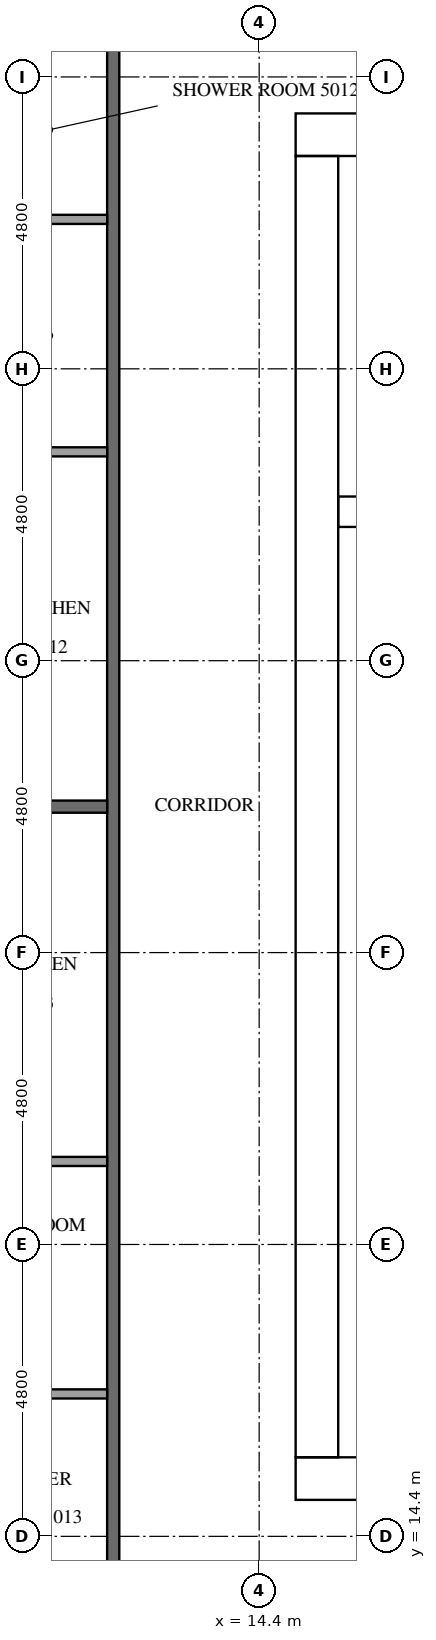
"""IFC4 building model, lengths in metres.
Left out: names, types, materials, properties, quantities, classifications, styles, units other than length and angle.
Written with IfcOpenShell. Run it as: python <this file> out.ifc"""

import sys

from ifc_helpers import new_model, si_unit, direction, frame, frame_2d, origin, place, context, subcontext, project, spatial, rectangle, extrude, element, fill, save


model = new_model("IFC4")
c1 = context("Model", 3, precision=1e-05, world=origin(), true_north=direction((0.0, 1.0)))
c2 = subcontext(c1, "Body", "Model", "MODEL_VIEW")
j1 = project(units=[si_unit("LENGTHUNIT", "METRE"), si_unit("PLANEANGLEUNIT", "RADIAN")], contexts=[c1])
p1 = place(None, origin())
s1 = spatial("IfcSite", under=j1, at=p1, CompositionType="ELEMENT")
p2 = place(p1, origin())
s2 = spatial("IfcBuilding", under=s1, at=p2, CompositionType="ELEMENT")
p3 = place(p2, frame((0.0, 0.0, 192.9)))
s3 = spatial("IfcBuildingStorey", under=s2, at=p3, CompositionType="ELEMENT", Elevation=192.9)
p4 = place(p3, frame((15.0, 15.35, 0.0), z_axis=(0.0, 0.0, 1.0), x_axis=(1.0, 0.0, 0.0)))
e1 = element("IfcWall", 1, at=p4, inside=s3, PredefinedType="SHEAR", context=c2, shape_type="SweptSolid", body=[
    extrude(rectangle(XDim=32.4, YDim=0.7, at=frame_2d((16.2, 0.0))), origin(), (0.0, 0.0, 1.0), 3.2),
])
p5 = place(p4, frame((15.3, 0.0, 0.0)))
e2 = element("IfcOpeningElement", 2, at=p5, cuts=e1, PredefinedType="OPENING", context=c2, shape_type="SweptSolid", body=[
    extrude(rectangle(XDim=1.8, YDim=2.1, at=frame_2d((0.9, 1.05))), frame((0.0, 0.36, 0.0), z_axis=(0.0, -1.0, 0.0), x_axis=(1.0, 0.0, 0.0)), (0.0, 0.0, 1.0), 0.72),
])
p6 = place(p3, frame((15.0, 37.45, 0.0), z_axis=(0.0, 0.0, 1.0), x_axis=(1.0, 0.0, 0.0)))
e3 = element("IfcWall", 3, at=p6, inside=s3, PredefinedType="SHEAR", context=c2, shape_type="SweptSolid", body=[
    extrude(rectangle(XDim=32.4, YDim=0.7, at=frame_2d((16.2, 0.0))), origin(), (0.0, 0.0, 1.0), 3.2),
])
p7 = place(p6, frame((15.3, 0.0, 0.0)))
e4 = element("IfcOpeningElement", 4, at=p7, cuts=e3, PredefinedType="OPENING", context=c2, shape_type="SweptSolid", body=[
    extrude(rectangle(XDim=1.8, YDim=2.1, at=frame_2d((0.9, 1.05))), frame((0.0, 0.36, 0.0), z_axis=(0.0, -1.0, 0.0), x_axis=(1.0, 0.0, 0.0)), (0.0, 0.0, 1.0), 0.72),
])
p8 = place(p6, frame((1.544, 0.0, 0.0)))
e5 = element("IfcOpeningElement", 5, at=p8, cuts=e3, PredefinedType="OPENING", context=c2, shape_type="SweptSolid", body=[
    extrude(rectangle(XDim=1.0, YDim=2.1, at=frame_2d((0.5, 1.05))), frame((0.0, 0.36, 0.0), z_axis=(0.0, -1.0, 0.0), x_axis=(1.0, 0.0, 0.0)), (0.0, 0.0, 1.0), 0.72),
])
p9 = place(p6, frame((5.219, 0.0, 0.0)))
e6 = element("IfcOpeningElement", 6, at=p9, cuts=e3, PredefinedType="OPENING", context=c2, shape_type="SweptSolid", body=[
    extrude(rectangle(XDim=1.0, YDim=2.1, at=frame_2d((0.5, 1.05))), frame((0.0, 0.36, 0.0), z_axis=(0.0, -1.0, 0.0), x_axis=(1.0, 0.0, 0.0)), (0.0, 0.0, 1.0), 0.72),
])
p10 = place(p3, frame((15.35, 15.7, 0.0), z_axis=(0.0, 0.0, 1.0), x_axis=(0.0, 1.0, 0.0)))
e7 = element("IfcWall", 7, at=p10, inside=s3, PredefinedType="SHEAR", context=c2, shape_type="SweptSolid", body=[
    extrude(rectangle(XDim=21.4, YDim=0.7, at=frame_2d((10.7, 0.0))), origin(), (0.0, 0.0, 1.0), 3.2),
])
p11 = place(p10, frame((5.06, 0.0, 0.0)))
e8 = element("IfcOpeningElement", 8, at=p11, cuts=e7, PredefinedType="OPENING", context=c2, shape_type="SweptSolid", body=[
    extrude(rectangle(XDim=1.2, YDim=2.1, at=frame_2d((0.6, 1.05))), frame((0.0, 0.36, 0.0), z_axis=(0.0, -1.0, 0.0), x_axis=(1.0, 0.0, 0.0)), (0.0, 0.0, 1.0), 0.72),
])
p12 = place(p3, frame((15.7, 31.25, 0.0), z_axis=(0.0, 0.0, 1.0), x_axis=(1.0, 0.0, 0.0)))
e9 = element("IfcWall", 9, at=p12, inside=s3, PredefinedType="SHEAR", context=c2, shape_type="SweptSolid", body=[
    extrude(rectangle(XDim=7.15, YDim=0.5, at=frame_2d((3.575, 0.0))), origin(), (0.0, 0.0, 1.0), 3.2),
])
p13 = place(p3, frame((12.0, 12.1, 0.0), z_axis=(0.0, 0.0, 1.0), x_axis=(0.0, 1.0, 0.0)))
e10 = element("IfcWall", 10, at=p13, inside=s3, PredefinedType="PARTITIONING", context=c2, shape_type="SweptSolid", body=[
    extrude(rectangle(XDim=28.6, YDim=0.2, at=frame_2d((14.3, 0.0))), origin(), (0.0, 0.0, 1.0), 3.2),
])
p14 = place(p13, frame((27.275, 0.0, 0.0)))
e11 = element("IfcOpeningElement", 11, at=p14, cuts=e10, PredefinedType="OPENING", context=c2, shape_type="SweptSolid", body=[
    extrude(rectangle(XDim=1.0, YDim=2.1, at=frame_2d((0.5, 1.05))), frame((0.0, 0.11, 0.0), z_axis=(0.0, -1.0, 0.0), x_axis=(1.0, 0.0, 0.0)), (0.0, 0.0, 1.0), 0.22),
])
p15 = place(p13, frame((0.325, 0.0, 0.0)))
e12 = element("IfcOpeningElement", 12, at=p15, cuts=e10, PredefinedType="OPENING", context=c2, shape_type="SweptSolid", body=[
    extrude(rectangle(XDim=1.0, YDim=2.1, at=frame_2d((0.5, 1.05))), frame((0.0, 0.11, 0.0), z_axis=(0.0, -1.0, 0.0), x_axis=(1.0, 0.0, 0.0)), (0.0, 0.0, 1.0), 0.22),
])
p16 = place(p3, frame((4.9, 26.4, 0.0), z_axis=(0.0, 0.0, 1.0), x_axis=(1.0, 0.0, 0.0)))
e13 = element("IfcWall", 13, at=p16, inside=s3, PredefinedType="PARTITIONING", context=c2, shape_type="SweptSolid", body=[
    extrude(rectangle(XDim=7.0, YDim=0.2, at=frame_2d((3.5, 0.0))), origin(), (0.0, 0.0, 1.0), 3.2),
])
for number, where, z_axis, x_axis in (
    (14, (11.9, 36.058, 0.0), (0.0, 0.0, 1.0), (-1.0, 0.0, 0.0)),
    (15, (11.9, 32.235, 0.0), (0.0, 0.0, 1.0), (-1.0, 0.0, 0.0)),
):
    element("IfcWall", number, at=place(p3, frame(where, z_axis=z_axis, x_axis=x_axis)), inside=s3, PredefinedType="PARTITIONING", context=c2, shape_type="SweptSolid", body=[
        extrude(rectangle(XDim=1.925, YDim=0.15, at=frame_2d((0.962, 0.0))), origin(), (0.0, 0.0, 1.0), 3.2),
    ])
for number, where, z_axis, x_axis in (
    (16, (11.9, 16.742, 0.0), (0.0, 0.0, 1.0), (-1.0, 0.0, 0.0)),
    (17, (11.9, 20.565, 0.0), (0.0, 0.0, 1.0), (-1.0, 0.0, 0.0)),
):
    element("IfcWall", number, at=place(p3, frame(where, z_axis=z_axis, x_axis=x_axis)), inside=s3, PredefinedType="PARTITIONING", context=c2, shape_type="SweptSolid", body=[
        extrude(rectangle(XDim=2.375, YDim=0.15, at=frame_2d((1.188, 0.0))), origin(), (0.0, 0.0, 1.0), 3.2),
    ])
p17 = place(p11, frame((1.2, 0.0, 0.0), z_axis=(0.0, 0.0, 1.0), x_axis=(-1.0, 0.0, 0.0)))
e18 = element("IfcDoor", 18, at=p17, inside=s3, OperationType="SINGLE_SWING_LEFT", PredefinedType="DOOR", context=c2, shape_type="SweptSolid", body=[
    extrude(rectangle(XDim=1.2, YDim=2.1, at=frame_2d((0.6, 1.05))), frame((0.0, 0.025, 0.0), z_axis=(0.0, -1.0, 0.0), x_axis=(1.0, 0.0, 0.0)), (0.0, 0.0, 1.0), 0.05),
])
fill(e8, e18)
save(model, sys.argv[1])
